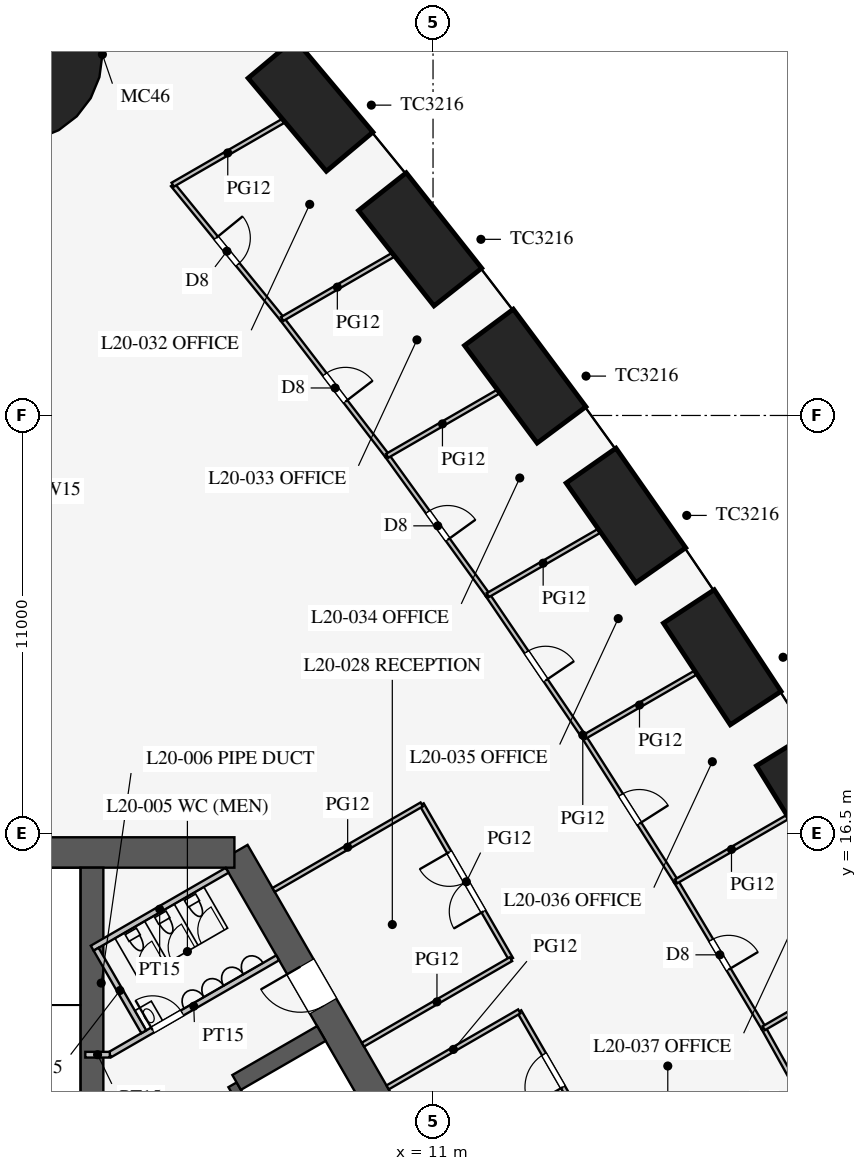
"""IFC4 building model, lengths in metres.
Left out: names, types, materials, properties, quantities, classifications, styles, units other than length and angle.
Written with IfcOpenShell. Run it as: python <this file> out.ifc"""

import sys

from ifc_helpers import new_model, si_unit, direction, frame, frame_2d, origin, origin_2d, place, context, subcontext, project, spatial, rectangle, circle, extrude, element, fill, save


model = new_model("IFC4")
c1 = context("Model", 3, precision=1e-05, world=origin(), true_north=direction((0.0, 1.0)))
c2 = subcontext(c1, "Body", "Model", "MODEL_VIEW")
j1 = project(units=[si_unit("LENGTHUNIT", "METRE"), si_unit("PLANEANGLEUNIT", "RADIAN")], contexts=[c1])
p1 = place(None, origin())
s1 = spatial("IfcSite", under=j1, at=p1, CompositionType="ELEMENT")
p2 = place(p1, origin())
s2 = spatial("IfcBuilding", under=s1, at=p2, CompositionType="ELEMENT")
p3 = place(p2, frame((0.0, 0.0, 87.9)))
s3 = spatial("IfcBuildingStorey", under=s2, at=p3, CompositionType="ELEMENT", Elevation=87.9)
for number, where, z_axis, x_axis in (
    (1, (21.031, 17.339, 0.0), (0.0, 0.0, 1.0), (-0.525, 0.851, 0.0)),
    (2, (18.611, 21.137, 0.0), (0.0, 0.0, 1.0), (-0.549, 0.836, 0.0)),
    (3, (16.076, 24.87, 0.0), (0.0, 0.0, 1.0), (-0.574, 0.819, 0.0)),
    (4, (13.426, 28.536, 0.0), (0.0, 0.0, 1.0), (-0.597, 0.802, 0.0)),
    (5, (10.66, 32.135, 0.0), (0.0, 0.0, 1.0), (-0.62, 0.784, 0.0)),
    (6, (7.776, 35.667, 0.0), (0.0, 0.0, 1.0), (-0.643, 0.766, 0.0)),
):
    element("IfcColumn", number, at=place(p3, frame(where, z_axis=z_axis, x_axis=x_axis)), inside=s3, PredefinedType="COLUMN", context=c2, shape_type="SweptSolid", body=[
        extrude(rectangle(XDim=3.2, YDim=1.6, at=origin_2d()), origin(), (0.0, 0.0, 1.0), 4.2),
    ])
p4 = place(p3, frame((0.0, 37.0, 0.0), z_axis=(0.0, 0.0, 1.0), x_axis=(1.0, 0.0, 0.0)))
e7 = element("IfcColumn", 7, at=p4, inside=s3, PredefinedType="COLUMN", context=c2, shape_type="SweptSolid", body=[
    extrude(circle(Radius=2.3, at=origin_2d()), origin(), (0.0, 0.0, 1.0), 4.2),
])
p5 = place(p3, frame((16.743, -3.0, 0.0), z_axis=(0.0, 0.0, 1.0), x_axis=(-0.500002442456, 0.866023993627, 0.0)))
e8 = element("IfcWall", 8, at=p5, inside=s3, PredefinedType="SHEAR", context=c2, shape_type="SweptSolid", body=[
    extrude(rectangle(XDim=21.939, YDim=0.8, at=frame_2d((10.97, 0.0))), origin(), (0.0, 0.0, 1.0), 4.2),
])
p6 = place(p5, frame((17.27, 0.0, 0.0)))
e9 = element("IfcOpeningElement", 9, at=p6, cuts=e8, PredefinedType="OPENING", context=c2, shape_type="SweptSolid", body=[
    extrude(rectangle(XDim=1.2, YDim=2.1, at=frame_2d((0.6, 1.05))), frame((0.0, 0.41, 0.0), z_axis=(0.0, -1.0, 0.0), x_axis=(1.0, 0.0, 0.0)), (0.0, 0.0, 1.0), 0.82),
])
p7 = place(p5, frame((3.47, 0.0, 0.0)))
e10 = element("IfcOpeningElement", 10, at=p7, cuts=e8, PredefinedType="OPENING", context=c2, shape_type="SweptSolid", body=[
    extrude(rectangle(XDim=1.2, YDim=2.1, at=frame_2d((0.6, 1.05))), frame((0.0, 0.41, 0.0), z_axis=(0.0, -1.0, 0.0), x_axis=(1.0, 0.0, 0.0)), (0.0, 0.0, 1.0), 0.82),
])
p8 = place(p3, frame((5.773, 16.0, 0.0), z_axis=(0.0, 0.0, 1.0), x_axis=(-1.0, 0.0, 0.0)))
e11 = element("IfcWall", 11, at=p8, inside=s3, PredefinedType="SHEAR", context=c2, shape_type="SweptSolid", body=[
    extrude(rectangle(XDim=11.547, YDim=0.8, at=frame_2d((5.773, 0.0))), origin(), (0.0, 0.0, 1.0), 4.2),
])
p9 = place(p3, frame((11.424, 0.014, 0.0), z_axis=(0.0, 0.0, 1.0), x_axis=(-0.500001763848, 0.866024385424, 0.0)))
e12 = element("IfcWall", 12, at=p9, inside=s3, PredefinedType="SHEAR", context=c2, shape_type="SweptSolid", body=[
    extrude(rectangle(XDim=11.4, YDim=0.25, at=frame_2d((5.7, 0.0))), origin(), (0.0, 0.0, 1.0), 4.2),
])
p10 = place(p3, frame((5.832, 9.949, 0.0), z_axis=(0.0, 0.0, 1.0), x_axis=(0.866029291668, 0.499993265928, 0.0)))
e13 = element("IfcWall", 13, at=p10, inside=s3, PredefinedType="SHEAR", context=c2, shape_type="SweptSolid", body=[
    extrude(rectangle(XDim=2.575, YDim=0.45, at=frame_2d((1.288, 0.0))), origin(), (0.0, 0.0, 1.0), 4.2),
])
p11 = place(p3, frame((2.025, 6.525, 0.0), z_axis=(0.0, 0.0, 1.0), x_axis=(0.0, 1.0, 0.0)))
e14 = element("IfcWall", 14, at=p11, inside=s3, PredefinedType="SHEAR", context=c2, shape_type="SweptSolid", body=[
    extrude(rectangle(XDim=9.075, YDim=0.6, at=frame_2d((4.538, 0.0))), origin(), (0.0, 0.0, 1.0), 4.2),
])
p12 = place(p3, frame((2.495, 10.678, 0.0), z_axis=(0.0, 0.0, 1.0), x_axis=(0.86602216432, 0.500005610874, 0.0)))
e15 = element("IfcWall", 15, at=p12, inside=s3, PredefinedType="PARTITIONING", context=c2, shape_type="SweptSolid", body=[
    extrude(rectangle(XDim=5.1, YDim=0.15, at=frame_2d((2.55, 0.0))), origin(), (0.0, 0.0, 1.0), 3.95),
])
p13 = place(p12, frame((1.3, 0.0, 0.0)))
e16 = element("IfcOpeningElement", 16, at=p13, cuts=e15, PredefinedType="OPENING", context=c2, shape_type="SweptSolid", body=[
    extrude(rectangle(XDim=0.9, YDim=2.1, at=frame_2d((0.45, 1.05))), frame((0.0, 0.085, 0.0), z_axis=(0.0, -1.0, 0.0), x_axis=(1.0, 0.0, 0.0)), (0.0, 0.0, 1.0), 0.17),
])
p14 = place(p3, frame((2.495, 10.678, 0.0), z_axis=(0.0, 0.0, 1.0), x_axis=(-1.0, 0.0, 0.0)))
e17 = element("IfcWall", 17, at=p14, inside=s3, PredefinedType="PARTITIONING", context=c2, shape_type="SweptSolid", body=[
    extrude(rectangle(XDim=0.645, YDim=0.15, at=frame_2d((0.323, 0.0))), origin(), (0.0, 0.0, 1.0), 3.95),
])
p15 = place(p3, frame((2.031, 13.482, 0.0), z_axis=(0.0, 0.0, 1.0), x_axis=(0.866050731258, 0.499956128963, 0.0)))
e18 = element("IfcWall", 18, at=p15, inside=s3, PredefinedType="PARTITIONING", context=c2, shape_type="SweptSolid", body=[
    extrude(rectangle(XDim=4.1, YDim=0.15, at=frame_2d((2.05, 0.0))), origin(), (0.0, 0.0, 1.0), 3.95),
])
p16 = place(p3, frame((3.389, 11.281, 0.0), z_axis=(0.0, 0.0, 1.0), x_axis=(-0.499989096993, 0.866031698547, 0.0)))
e19 = element("IfcWall", 19, at=p16, inside=s3, PredefinedType="PARTITIONING", context=c2, shape_type="SweptSolid", body=[
    extrude(rectangle(XDim=2.51, YDim=0.15, at=frame_2d((1.255, 0.0))), origin(), (0.0, 0.0, 1.0), 3.95),
])
p17 = place(p3, frame((13.052, 13.194, 0.0), z_axis=(0.0, 0.0, 1.0), x_axis=(-0.499977259774, 0.866038532462, 0.0)))
e20 = element("IfcWall", 20, at=p17, inside=s3, PredefinedType="PARTITIONING", context=c2, shape_type="SweptSolid", body=[
    extrude(rectangle(XDim=4.7, YDim=0.12, at=frame_2d((2.35, 0.0))), origin(), (0.0, 0.0, 1.0), 2.9),
])
p18 = place(p17, frame((1.45, 0.0, 0.15)))
e21 = element("IfcOpeningElement", 21, at=p18, cuts=e20, PredefinedType="OPENING", context=c2, shape_type="SweptSolid", body=[
    extrude(rectangle(XDim=1.8, YDim=2.1, at=frame_2d((0.9, 1.05))), frame((0.0, 0.07, 0.0), z_axis=(0.0, -1.0, 0.0), x_axis=(1.0, 0.0, 0.0)), (0.0, 0.0, 1.0), 0.14),
])
p19 = place(p3, frame((15.069, 8.7, 0.0), z_axis=(0.0, 0.0, 1.0), x_axis=(-0.500012057535, 0.866018442252, 0.0)))
e22 = element("IfcWall", 22, at=p19, inside=s3, PredefinedType="PARTITIONING", context=c2, shape_type="SweptSolid", body=[
    extrude(rectangle(XDim=3.6, YDim=0.12, at=frame_2d((1.8, 0.0))), origin(), (0.0, 0.0, 1.0), 2.9),
])
p20 = place(p19, frame((1.3, 0.0, 0.15)))
e23 = element("IfcOpeningElement", 23, at=p20, cuts=e22, PredefinedType="OPENING", context=c2, shape_type="SweptSolid", body=[
    extrude(rectangle(XDim=1.0, YDim=2.1, at=frame_2d((0.5, 1.05))), frame((0.0, 0.07, 0.0), z_axis=(0.0, -1.0, 0.0), x_axis=(1.0, 0.0, 0.0)), (0.0, 0.0, 1.0), 0.14),
])
p21 = place(p3, frame((9.805, 9.818, 0.0), z_axis=(0.0, 0.0, 1.0), x_axis=(0.866026010844, 0.49999894854, 0.0)))
e24 = element("IfcWall", 24, at=p21, inside=s3, PredefinedType="PARTITIONING", context=c2, shape_type="SweptSolid", body=[
    extrude(rectangle(XDim=4.0, YDim=0.12, at=frame_2d((2.0, 0.0))), origin(), (0.0, 0.0, 1.0), 2.9),
])
p22 = place(p3, frame((9.155, 10.944, 0.0), z_axis=(0.0, 0.0, 1.0), x_axis=(0.866017533419, 0.500013631625, 0.0)))
e25 = element("IfcWall", 25, at=p22, inside=s3, PredefinedType="PARTITIONING", context=c2, shape_type="SweptSolid", body=[
    extrude(rectangle(XDim=4.5, YDim=0.12, at=frame_2d((2.25, 0.0))), origin(), (0.0, 0.0, 1.0), 2.9),
])
p23 = place(p3, frame((6.805, 15.014, 0.0), z_axis=(0.0, 0.0, 1.0), x_axis=(0.866031096941, 0.499990139034, 0.0)))
e26 = element("IfcWall", 26, at=p23, inside=s3, PredefinedType="PARTITIONING", context=c2, shape_type="SweptSolid", body=[
    extrude(rectangle(XDim=4.5, YDim=0.12, at=frame_2d((2.25, 0.0))), origin(), (0.0, 0.0, 1.0), 2.9),
])
p24 = place(p3, frame((19.701, 11.374, 0.0), z_axis=(0.0, 0.0, 1.0), x_axis=(-0.512483962191, 0.858696796604, 0.0)))
e27 = element("IfcWall", 27, at=p24, inside=s3, PredefinedType="PARTITIONING", context=c2, shape_type="SweptSolid", body=[
    extrude(rectangle(XDim=4.5, YDim=0.12, at=frame_2d((2.25, 0.0))), origin(), (0.0, 0.0, 1.0), 2.9),
])
p25 = place(p24, frame((1.8, 0.0, 0.15)))
e28 = element("IfcOpeningElement", 28, at=p25, cuts=e27, PredefinedType="OPENING", context=c2, shape_type="SweptSolid", body=[
    extrude(rectangle(XDim=0.9, YDim=2.1, at=frame_2d((0.45, 1.05))), frame((0.0, 0.07, 0.0), z_axis=(0.0, -1.0, 0.0), x_axis=(1.0, 0.0, 0.0)), (0.0, 0.0, 1.0), 0.14),
])
p26 = place(p3, frame((12.441, 22.771, 0.0), z_axis=(0.0, 0.0, 1.0), x_axis=(-0.585376255171, 0.810761765183, 0.0)))
e29 = element("IfcWall", 29, at=p26, inside=s3, PredefinedType="PARTITIONING", context=c2, shape_type="SweptSolid", body=[
    extrude(rectangle(XDim=4.523, YDim=0.12, at=frame_2d((2.262, 0.0))), origin(), (0.0, 0.0, 1.0), 2.9),
])
p27 = place(p26, frame((1.8, 0.0, 0.15)))
e30 = element("IfcOpeningElement", 30, at=p27, cuts=e29, PredefinedType="OPENING", context=c2, shape_type="SweptSolid", body=[
    extrude(rectangle(XDim=0.9, YDim=2.1, at=frame_2d((0.45, 1.05))), frame((0.0, 0.07, 0.0), z_axis=(0.0, -1.0, 0.0), x_axis=(1.0, 0.0, 0.0)), (0.0, 0.0, 1.0), 0.14),
])
p28 = place(p3, frame((9.793, 26.439, 0.0), z_axis=(0.0, 0.0, 1.0), x_axis=(-0.608784932975, 0.79333530451, 0.0)))
e31 = element("IfcWall", 31, at=p28, inside=s3, PredefinedType="PARTITIONING", context=c2, shape_type="SweptSolid", body=[
    extrude(rectangle(XDim=4.539, YDim=0.12, at=frame_2d((2.27, 0.0))), origin(), (0.0, 0.0, 1.0), 2.9),
])
p29 = place(p28, frame((1.8, 0.0, 0.15)))
e32 = element("IfcOpeningElement", 32, at=p29, cuts=e31, PredefinedType="OPENING", context=c2, shape_type="SweptSolid", body=[
    extrude(rectangle(XDim=0.9, YDim=2.1, at=frame_2d((0.45, 1.05))), frame((0.0, 0.07, 0.0), z_axis=(0.0, -1.0, 0.0), x_axis=(1.0, 0.0, 0.0)), (0.0, 0.0, 1.0), 0.14),
])
p30 = place(p3, frame((7.03, 30.04, 0.0), z_axis=(0.0, 0.0, 1.0), x_axis=(-0.631833879056, 0.775103831288, 0.0)))
e33 = element("IfcWall", 33, at=p30, inside=s3, PredefinedType="PARTITIONING", context=c2, shape_type="SweptSolid", body=[
    extrude(rectangle(XDim=4.558, YDim=0.12, at=frame_2d((2.279, 0.0))), origin(), (0.0, 0.0, 1.0), 2.9),
])
p31 = place(p30, frame((1.85, 0.0, 0.15)))
e34 = element("IfcOpeningElement", 34, at=p31, cuts=e33, PredefinedType="OPENING", context=c2, shape_type="SweptSolid", body=[
    extrude(rectangle(XDim=0.9, YDim=2.1, at=frame_2d((0.45, 1.05))), frame((0.0, 0.07, 0.0), z_axis=(0.0, -1.0, 0.0), x_axis=(1.0, 0.0, 0.0)), (0.0, 0.0, 1.0), 0.14),
])
p32 = place(p3, frame((17.395, 15.239, 0.0), z_axis=(0.0, 0.0, 1.0), x_axis=(-0.537243691336, 0.843427066272, 0.0)))
e35 = element("IfcWall", 35, at=p32, inside=s3, PredefinedType="PARTITIONING", context=c2, shape_type="SweptSolid", body=[
    extrude(rectangle(XDim=4.504, YDim=0.12, at=frame_2d((2.252, 0.0))), origin(), (0.0, 0.0, 1.0), 2.9),
])
p33 = place(p32, frame((1.8, 0.0, 0.15)))
e36 = element("IfcOpeningElement", 36, at=p33, cuts=e35, PredefinedType="OPENING", context=c2, shape_type="SweptSolid", body=[
    extrude(rectangle(XDim=0.9, YDim=2.1, at=frame_2d((0.45, 1.05))), frame((0.0, 0.07, 0.0), z_axis=(0.0, -1.0, 0.0), x_axis=(1.0, 0.0, 0.0)), (0.0, 0.0, 1.0), 0.14),
])
p34 = place(p3, frame((14.975, 19.038, 0.0), z_axis=(0.0, 0.0, 1.0), x_axis=(-0.561512004239, 0.827468591002, 0.0)))
e37 = element("IfcWall", 37, at=p34, inside=s3, PredefinedType="PARTITIONING", context=c2, shape_type="SweptSolid", body=[
    extrude(rectangle(XDim=4.512, YDim=0.12, at=frame_2d((2.256, 0.0))), origin(), (0.0, 0.0, 1.0), 2.9),
])
p35 = place(p34, frame((1.8, 0.0, 0.15)))
e38 = element("IfcOpeningElement", 38, at=p35, cuts=e37, PredefinedType="OPENING", context=c2, shape_type="SweptSolid", body=[
    extrude(rectangle(XDim=0.9, YDim=2.1, at=frame_2d((0.45, 1.05))), frame((0.0, 0.07, 0.0), z_axis=(0.0, -1.0, 0.0), x_axis=(1.0, 0.0, 0.0)), (0.0, 0.0, 1.0), 0.14),
])
p36 = place(p3, frame((21.895, 7.445, 0.0), z_axis=(0.0, 0.0, 1.0), x_axis=(-0.487415216275, 0.87317031955, 0.0)))
e39 = element("IfcWall", 39, at=p36, inside=s3, PredefinedType="PARTITIONING", context=c2, shape_type="SweptSolid", body=[
    extrude(rectangle(XDim=4.5, YDim=0.12, at=frame_2d((2.25, 0.0))), origin(), (0.0, 0.0, 1.0), 2.9),
])
p37 = place(p36, frame((1.8, 0.0, 0.15)))
e40 = element("IfcOpeningElement", 40, at=p37, cuts=e39, PredefinedType="OPENING", context=c2, shape_type="SweptSolid", body=[
    extrude(rectangle(XDim=0.9, YDim=2.1, at=frame_2d((0.45, 1.05))), frame((0.0, 0.07, 0.0), z_axis=(0.0, -1.0, 0.0), x_axis=(1.0, 0.0, 0.0)), (0.0, 0.0, 1.0), 0.14),
])
p38 = place(p3, frame((19.701, 11.374, 0.0), z_axis=(0.0, 0.0, 1.0), x_axis=(0.866014270972, 0.500019282102, 0.0)))
e41 = element("IfcWall", 41, at=p38, inside=s3, PredefinedType="PARTITIONING", context=c2, shape_type="SweptSolid", body=[
    extrude(rectangle(XDim=3.37, YDim=0.12, at=frame_2d((1.685, 0.0))), origin(), (0.0, 0.0, 1.0), 2.15),
])
p39 = place(p3, frame((12.441, 22.771, 0.0), z_axis=(0.0, 0.0, 1.0), x_axis=(0.865992196602, 0.500057512117, 0.0)))
e42 = element("IfcWall", 42, at=p39, inside=s3, PredefinedType="PARTITIONING", context=c2, shape_type="SweptSolid", body=[
    extrude(rectangle(XDim=3.364, YDim=0.12, at=frame_2d((1.682, 0.0))), origin(), (0.0, 0.0, 1.0), 2.15),
])
p40 = place(p3, frame((9.793, 26.439, 0.0), z_axis=(0.0, 0.0, 1.0), x_axis=(0.866029446706, 0.499992997389, 0.0)))
e43 = element("IfcWall", 43, at=p40, inside=s3, PredefinedType="PARTITIONING", context=c2, shape_type="SweptSolid", body=[
    extrude(rectangle(XDim=3.359, YDim=0.12, at=frame_2d((1.679, 0.0))), origin(), (0.0, 0.0, 1.0), 2.15),
])
p41 = place(p3, frame((7.03, 30.04, 0.0), z_axis=(0.0, 0.0, 1.0), x_axis=(0.866038859646, 0.49997669304, 0.0)))
e44 = element("IfcWall", 44, at=p41, inside=s3, PredefinedType="PARTITIONING", context=c2, shape_type="SweptSolid", body=[
    extrude(rectangle(XDim=3.353, YDim=0.12, at=frame_2d((1.676, 0.0))), origin(), (0.0, 0.0, 1.0), 2.35),
])
p42 = place(p3, frame((4.15, 33.573, 0.0), z_axis=(0.0, 0.0, 1.0), x_axis=(0.866002045187, 0.500040456096, 0.0)))
e45 = element("IfcWall", 45, at=p42, inside=s3, PredefinedType="PARTITIONING", context=c2, shape_type="SweptSolid", body=[
    extrude(rectangle(XDim=3.345, YDim=0.12, at=frame_2d((1.672, 0.0))), origin(), (0.0, 0.0, 1.0), 2.55),
])
p43 = place(p3, frame((17.395, 15.239, 0.0), z_axis=(0.0, 0.0, 1.0), x_axis=(0.865991297194, 0.500059069696, 0.0)))
e46 = element("IfcWall", 46, at=p43, inside=s3, PredefinedType="PARTITIONING", context=c2, shape_type="SweptSolid", body=[
    extrude(rectangle(XDim=3.369, YDim=0.12, at=frame_2d((1.685, 0.0))), origin(), (0.0, 0.0, 1.0), 2.15),
])
p44 = place(p3, frame((14.975, 19.038, 0.0), z_axis=(0.0, 0.0, 1.0), x_axis=(0.866039498442, 0.499975586543, 0.0)))
e47 = element("IfcWall", 47, at=p44, inside=s3, PredefinedType="PARTITIONING", context=c2, shape_type="SweptSolid", body=[
    extrude(rectangle(XDim=3.367, YDim=0.12, at=frame_2d((1.684, 0.0))), origin(), (0.0, 0.0, 1.0), 2.15),
])
p45 = place(p13, origin())
e48 = element("IfcDoor", 48, at=p45, inside=s3, OperationType="SINGLE_SWING_LEFT", PredefinedType="DOOR", context=c2, shape_type="SweptSolid", body=[
    extrude(rectangle(XDim=0.9, YDim=2.1, at=frame_2d((0.45, 1.05))), frame((0.0, 0.025, 0.0), z_axis=(0.0, -1.0, 0.0), x_axis=(1.0, 0.0, 0.0)), (0.0, 0.0, 1.0), 0.05),
])
fill(e16, e48)
p46 = place(p6, origin())
e49 = element("IfcDoor", 49, at=p46, inside=s3, OperationType="SINGLE_SWING_RIGHT", PredefinedType="DOOR", context=c2, shape_type="SweptSolid", body=[
    extrude(rectangle(XDim=1.2, YDim=2.1, at=frame_2d((0.6, 1.05))), frame((0.0, 0.025, 0.0), z_axis=(0.0, -1.0, 0.0), x_axis=(1.0, 0.0, 0.0)), (0.0, 0.0, 1.0), 0.05),
])
fill(e9, e49)
p47 = place(p18, origin())
e50 = element("IfcDoor", 50, at=p47, inside=s3, OperationType="DOUBLE_DOOR_SINGLE_SWING", PredefinedType="DOOR", context=c2, shape_type="SweptSolid", body=[
    extrude(rectangle(XDim=1.8, YDim=2.1, at=frame_2d((0.9, 1.05))), frame((0.0, 0.025, 0.0), z_axis=(0.0, -1.0, 0.0), x_axis=(1.0, 0.0, 0.0)), (0.0, 0.0, 1.0), 0.05),
])
fill(e21, e50)
p48 = place(p20, origin())
e51 = element("IfcDoor", 51, at=p48, inside=s3, OperationType="SINGLE_SWING_LEFT", PredefinedType="DOOR", context=c2, shape_type="SweptSolid", body=[
    extrude(rectangle(XDim=1.0, YDim=2.1, at=frame_2d((0.5, 1.05))), frame((0.0, 0.025, 0.0), z_axis=(0.0, -1.0, 0.0), x_axis=(1.0, 0.0, 0.0)), (0.0, 0.0, 1.0), 0.05),
])
fill(e23, e51)
p49 = place(p31, frame((0.9, 0.0, 0.0), z_axis=(0.0, 0.0, 1.0), x_axis=(-1.0, 0.0, 0.0)))
e52 = element("IfcDoor", 52, at=p49, inside=s3, OperationType="SINGLE_SWING_LEFT", PredefinedType="DOOR", context=c2, shape_type="SweptSolid", body=[
    extrude(rectangle(XDim=0.9, YDim=2.1, at=frame_2d((0.45, 1.05))), frame((0.0, 0.025, 0.0), z_axis=(0.0, -1.0, 0.0), x_axis=(1.0, 0.0, 0.0)), (0.0, 0.0, 1.0), 0.05),
])
fill(e34, e52)
p50 = place(p29, frame((0.9, 0.0, 0.0), z_axis=(0.0, 0.0, 1.0), x_axis=(-1.0, 0.0, 0.0)))
e53 = element("IfcDoor", 53, at=p50, inside=s3, OperationType="SINGLE_SWING_RIGHT", PredefinedType="DOOR", context=c2, shape_type="SweptSolid", body=[
    extrude(rectangle(XDim=0.9, YDim=2.1, at=frame_2d((0.45, 1.05))), frame((0.0, 0.025, 0.0), z_axis=(0.0, -1.0, 0.0), x_axis=(1.0, 0.0, 0.0)), (0.0, 0.0, 1.0), 0.05),
])
fill(e32, e53)
p51 = place(p27, frame((0.9, 0.0, 0.0), z_axis=(0.0, 0.0, 1.0), x_axis=(-1.0, 0.0, 0.0)))
e54 = element("IfcDoor", 54, at=p51, inside=s3, OperationType="SINGLE_SWING_RIGHT", PredefinedType="DOOR", context=c2, shape_type="SweptSolid", body=[
    extrude(rectangle(XDim=0.9, YDim=2.1, at=frame_2d((0.45, 1.05))), frame((0.0, 0.025, 0.0), z_axis=(0.0, -1.0, 0.0), x_axis=(1.0, 0.0, 0.0)), (0.0, 0.0, 1.0), 0.05),
])
fill(e30, e54)
p52 = place(p35, frame((0.9, 0.0, 0.0), z_axis=(0.0, 0.0, 1.0), x_axis=(-1.0, 0.0, 0.0)))
e55 = element("IfcDoor", 55, at=p52, inside=s3, OperationType="SINGLE_SWING_RIGHT", PredefinedType="DOOR", context=c2, shape_type="SweptSolid", body=[
    extrude(rectangle(XDim=0.9, YDim=2.1, at=frame_2d((0.45, 1.05))), frame((0.0, 0.025, 0.0), z_axis=(0.0, -1.0, 0.0), x_axis=(1.0, 0.0, 0.0)), (0.0, 0.0, 1.0), 0.05),
])
fill(e38, e55)
p53 = place(p33, frame((0.9, 0.0, 0.0), z_axis=(0.0, 0.0, 1.0), x_axis=(-1.0, 0.0, 0.0)))
e56 = element("IfcDoor", 56, at=p53, inside=s3, OperationType="SINGLE_SWING_RIGHT", PredefinedType="DOOR", context=c2, shape_type="SweptSolid", body=[
    extrude(rectangle(XDim=0.9, YDim=2.1, at=frame_2d((0.45, 1.05))), frame((0.0, 0.025, 0.0), z_axis=(0.0, -1.0, 0.0), x_axis=(1.0, 0.0, 0.0)), (0.0, 0.0, 1.0), 0.05),
])
fill(e36, e56)
p54 = place(p25, frame((0.9, 0.0, 0.0), z_axis=(0.0, 0.0, 1.0), x_axis=(-1.0, 0.0, 0.0)))
e57 = element("IfcDoor", 57, at=p54, inside=s3, OperationType="SINGLE_SWING_RIGHT", PredefinedType="DOOR", context=c2, shape_type="SweptSolid", body=[
    extrude(rectangle(XDim=0.9, YDim=2.1, at=frame_2d((0.45, 1.05))), frame((0.0, 0.025, 0.0), z_axis=(0.0, -1.0, 0.0), x_axis=(1.0, 0.0, 0.0)), (0.0, 0.0, 1.0), 0.05),
])
fill(e28, e57)
save(model, sys.argv[1])
